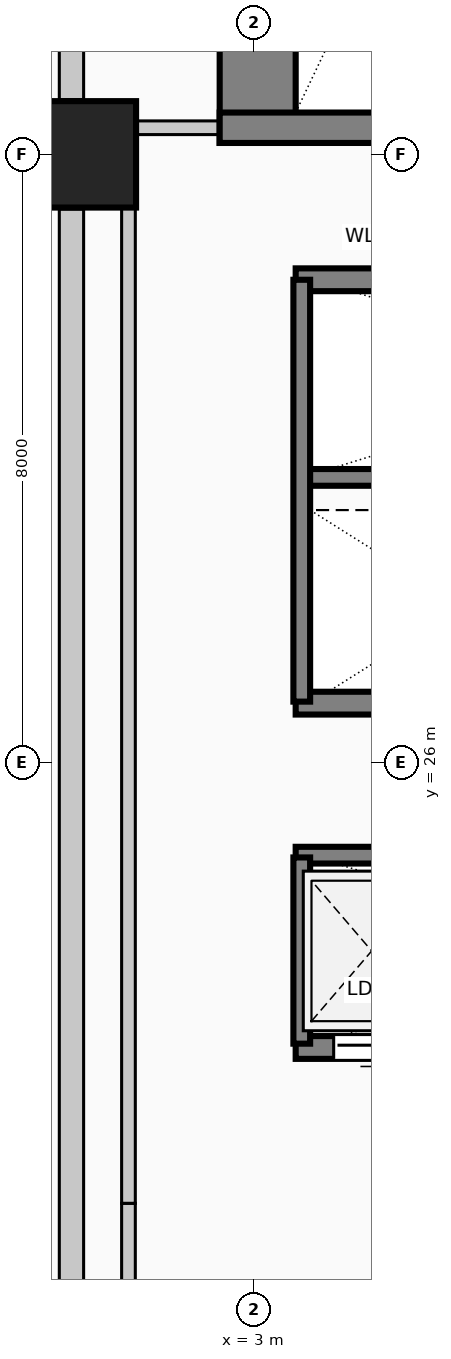
"""IFC4 building model, lengths in metres.
Left out: names, types, materials, properties, quantities, classifications, styles, units other than length and angle.
Written with IfcOpenShell. Run it as: python <this file> out.ifc"""

import sys

from ifc_helpers import new_model, si_unit, direction, frame, frame_2d, origin, origin_2d, place, context, subcontext, project, spatial, rectangle, extrude, element, fill, save


model = new_model("IFC4")
c1 = context("Model", 3, precision=1e-05, world=origin(), true_north=direction((0.0, 1.0)))
c2 = subcontext(c1, "Body", "Model", "MODEL_VIEW")
j1 = project(units=[si_unit("LENGTHUNIT", "METRE"), si_unit("PLANEANGLEUNIT", "RADIAN")], contexts=[c1])
p1 = place(None, origin())
s1 = spatial("IfcSite", under=j1, at=p1, CompositionType="ELEMENT")
p2 = place(p1, origin())
s2 = spatial("IfcBuilding", under=s1, at=p2, CompositionType="ELEMENT")
p3 = place(p2, frame((0.0, 0.0, 13.5)))
s3 = spatial("IfcBuildingStorey", under=s2, at=p3, CompositionType="ELEMENT", Elevation=13.5)
p4 = place(p3, frame((3.05, 34.15, 0.0), z_axis=(0.0, 0.0, 1.0), x_axis=(0.0, 1.0, 0.0)))
e1 = element("IfcWall", 1, at=p4, inside=s3, PredefinedType="SHEAR", context=c2, shape_type="SweptSolid", body=[
    extrude(rectangle(XDim=9.28, YDim=1.0, at=frame_2d((4.64, 0.0))), origin(), (0.0, 0.0, 1.0), 4.05),
])
p5 = place(p3, frame((2.55, 34.35, 0.0), z_axis=(0.0, 0.0, 1.0), x_axis=(1.0, 0.0, 0.0)))
e2 = element("IfcWall", 2, at=p5, inside=s3, PredefinedType="SHEAR", context=c2, shape_type="SweptSolid", body=[
    extrude(rectangle(XDim=5.16, YDim=0.4, at=frame_2d((2.58, 0.0))), origin(), (0.0, 0.0, 1.0), 4.05),
])
p6 = place(p5, frame((2.4, 0.0, 0.0)))
e3 = element("IfcOpeningElement", 3, at=p6, cuts=e2, PredefinedType="OPENING", context=c2, shape_type="SweptSolid", body=[
    extrude(rectangle(XDim=1.15, YDim=2.2, at=frame_2d((0.575, 1.1))), frame((0.0, 0.21, 0.0), z_axis=(0.0, -1.0, 0.0), x_axis=(1.0, 0.0, 0.0)), (0.0, 0.0, 1.0), 0.42),
])
p7 = place(p3, frame((0.6, 34.0, 0.0), z_axis=(0.0, 0.0, 1.0), x_axis=(0.0, 1.0, 0.0)))
e4 = element("IfcColumn", 4, at=p7, inside=s3, PredefinedType="COLUMN", context=c2, shape_type="SweptSolid", body=[
    extrude(rectangle(XDim=1.4, YDim=1.7, at=origin_2d()), origin(), (0.0, 0.0, 1.0), 4.05),
])
p8 = place(p3, frame((0.6, 18.72, 0.0), z_axis=(0.0, 0.0, 1.0), x_axis=(0.0, 1.0, 0.0)))
e5 = element("IfcWall", 5, at=p8, inside=s3, PredefinedType="SOLIDWALL", context=c2, shape_type="SweptSolid", body=[
    extrude(rectangle(XDim=14.56, YDim=0.32, at=frame_2d((7.28, 0.0))), origin(), (0.0, 0.0, 1.0), 2.7),
])
p9 = place(p3, frame((0.6, 34.72, 0.0), z_axis=(0.0, 0.0, 1.0), x_axis=(0.0, 1.0, 0.0)))
e6 = element("IfcWall", 6, at=p9, inside=s3, PredefinedType="SOLIDWALL", context=c2, shape_type="SweptSolid", body=[
    extrude(rectangle(XDim=6.96, YDim=0.32, at=frame_2d((3.48, 0.0))), origin(), (0.0, 0.0, 1.0), 2.7),
])
p10 = place(p3, frame((5.65, 22.25, 0.0), z_axis=(0.0, 0.0, 1.0), x_axis=(-1.0, 0.0, 0.0)))
e7 = element("IfcWall", 7, at=p10, inside=s3, PredefinedType="SOLIDWALL", context=c2, shape_type="SweptSolid", body=[
    extrude(rectangle(XDim=2.1, YDim=0.3, at=frame_2d((1.05, 0.0))), origin(), (0.0, 0.0, 1.0), 4.05),
])
p11 = place(p10, frame((0.5, 0.0, 0.0)))
e8 = element("IfcOpeningElement", 8, at=p11, cuts=e7, PredefinedType="OPENING", context=c2, shape_type="SweptSolid", body=[
    extrude(rectangle(XDim=1.1, YDim=2.2, at=frame_2d((0.55, 1.1))), frame((0.0, 0.16, 0.0), z_axis=(0.0, -1.0, 0.0), x_axis=(1.0, 0.0, 0.0)), (0.0, 0.0, 1.0), 0.32),
])
for number, where, z_axis, x_axis in (
    (9, (3.55, 32.35, 0.0), (0.0, 0.0, 1.0), (1.0, 0.0, 0.0)),
    (10, (5.65, 26.78, 0.0), (0.0, 0.0, 1.0), (-1.0, 0.0, 0.0)),
):
    element("IfcWall", number, at=place(p3, frame(where, z_axis=z_axis, x_axis=x_axis)), inside=s3, PredefinedType="SOLIDWALL", context=c2, shape_type="SweptSolid", body=[
        extrude(rectangle(XDim=2.1, YDim=0.3, at=frame_2d((1.05, 0.0))), origin(), (0.0, 0.0, 1.0), 4.05),
    ])
p12 = place(p3, frame((3.55, 29.75, 0.0), z_axis=(0.0, 0.0, 1.0), x_axis=(1.0, 0.0, 0.0)))
e11 = element("IfcWall", 11, at=p12, inside=s3, PredefinedType="SOLIDWALL", context=c2, shape_type="SweptSolid", body=[
    extrude(rectangle(XDim=8.65, YDim=0.22, at=frame_2d((4.325, 0.0))), origin(), (0.0, 0.0, 1.0), 4.05),
])
p13 = place(p3, frame((3.63, 26.8, 0.0), z_axis=(0.0, 0.0, 1.0), x_axis=(0.0, 1.0, 0.0)))
e12 = element("IfcWall", 12, at=p13, inside=s3, PredefinedType="SOLIDWALL", context=c2, shape_type="SweptSolid", body=[
    extrude(rectangle(XDim=5.55, YDim=0.22, at=frame_2d((2.775, 0.0))), origin(), (0.0, 0.0, 1.0), 4.05),
])
p14 = place(p3, frame((3.55, 24.78, 0.0), z_axis=(0.0, 0.0, 1.0), x_axis=(1.0, 0.0, 0.0)))
e13 = element("IfcWall", 13, at=p14, inside=s3, PredefinedType="SOLIDWALL", context=c2, shape_type="SweptSolid", body=[
    extrude(rectangle(XDim=8.65, YDim=0.22, at=frame_2d((4.325, 0.0))), origin(), (0.0, 0.0, 1.0), 4.05),
])
p15 = place(p3, frame((3.63, 22.3, 0.0), z_axis=(0.0, 0.0, 1.0), x_axis=(0.0, 1.0, 0.0)))
e14 = element("IfcWall", 14, at=p15, inside=s3, PredefinedType="SOLIDWALL", context=c2, shape_type="SweptSolid", body=[
    extrude(rectangle(XDim=2.45, YDim=0.22, at=frame_2d((1.225, 0.0))), origin(), (0.0, 0.0, 1.0), 4.05),
])
p16 = place(p3, frame((1.45, 34.35, 0.0), z_axis=(0.0, 0.0, 1.0), x_axis=(1.0, 0.0, 0.0)))
e15 = element("IfcWall", 15, at=p16, inside=s3, PredefinedType="PARTITIONING", context=c2, shape_type="SweptSolid", body=[
    extrude(rectangle(XDim=1.1, YDim=0.18, at=frame_2d((0.55, 0.0))), origin(), (0.0, 0.0, 1.0), 2.695),
])
p17 = place(p3, frame((1.35, 19.09, 0.0), z_axis=(0.0, 0.0, 1.0), x_axis=(0.0, 1.0, 0.0)))
e16 = element("IfcWall", 16, at=p17, inside=s3, PredefinedType="PARTITIONING", context=c2, shape_type="SweptSolid", body=[
    extrude(rectangle(XDim=1.11, YDim=0.18, at=frame_2d((0.555, 0.0))), origin(), (0.0, 0.0, 1.0), 3.65),
])
p18 = place(p3, frame((1.35, 20.2, 0.0), z_axis=(0.0, 0.0, 1.0), x_axis=(0.0, 1.0, 0.0)))
e17 = element("IfcWall", 17, at=p18, inside=s3, PredefinedType="PARTITIONING", context=c2, shape_type="SweptSolid", body=[
    extrude(rectangle(XDim=13.1, YDim=0.18, at=frame_2d((6.55, 0.0))), origin(), (0.0, 0.0, 1.0), 3.65),
])
p19 = place(p11, origin())
e18 = element("IfcDoor", 18, at=p19, inside=s3, OperationType="SLIDING_TO_LEFT", PredefinedType="DOOR", context=c2, shape_type="SweptSolid", body=[
    extrude(rectangle(XDim=1.1, YDim=2.2, at=frame_2d((0.55, 1.1))), frame((0.0, 0.025, 0.0), z_axis=(0.0, -1.0, 0.0), x_axis=(1.0, 0.0, 0.0)), (0.0, 0.0, 1.0), 0.05),
])
fill(e8, e18)
save(model, sys.argv[1])
